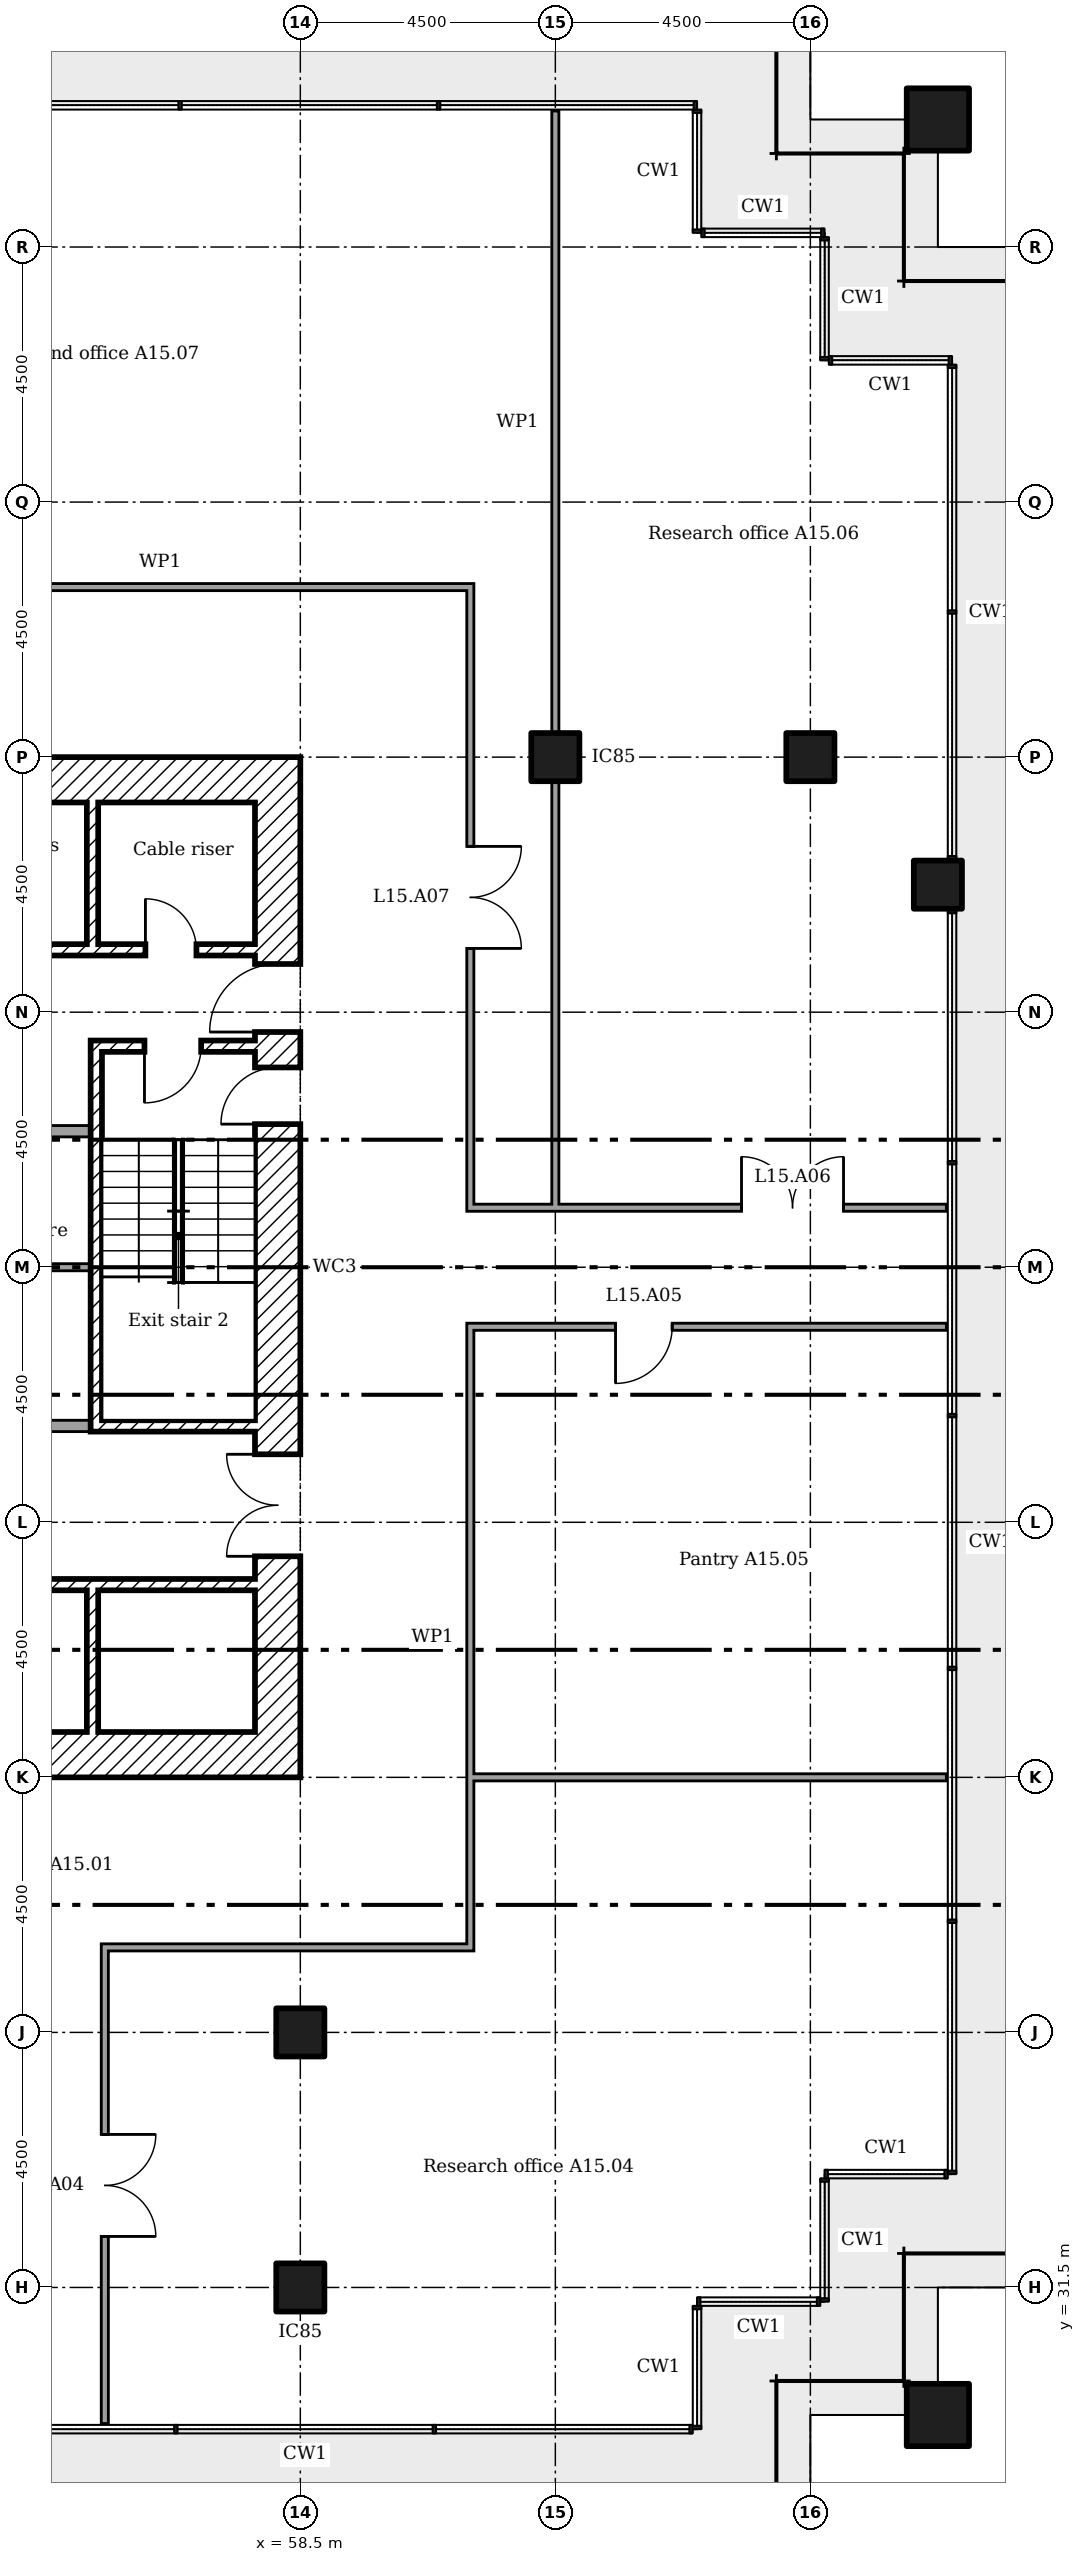
"""IFC4 building model, lengths in metres.
Left out: names, types, materials, properties, quantities, classifications, styles, units other than length and angle.
Written with IfcOpenShell. Run it as: python <this file> out.ifc"""

import sys

from ifc_helpers import new_model, si_unit, direction, frame, frame_2d, origin, origin_2d, place, context, subcontext, project, spatial, rectangle, extrude, element, fill, save


model = new_model("IFC4")
c1 = context("Model", 3, precision=1e-05, world=origin(), true_north=direction((0.0, 1.0)))
c2 = subcontext(c1, "Body", "Model", "MODEL_VIEW")
j1 = project(units=[si_unit("LENGTHUNIT", "METRE"), si_unit("PLANEANGLEUNIT", "RADIAN")], contexts=[c1])
p1 = place(None, origin())
s1 = spatial("IfcSite", under=j1, at=p1, CompositionType="ELEMENT")
p2 = place(p1, origin())
s2 = spatial("IfcBuilding", under=s1, at=p2, CompositionType="ELEMENT")
p3 = place(p2, frame((0.0, 0.0, 65.4)))
s3 = spatial("IfcBuildingStorey", under=s2, at=p3, CompositionType="ELEMENT", Elevation=65.4)
for number, where in (
    (1, (69.75, 29.25, 0.0)),
    (2, (69.75, 69.75, 0.0)),
):
    element("IfcColumn", number, at=place(p3, frame(where)), inside=s3, PredefinedType="COLUMN", context=c2, shape_type="SweptSolid", body=[
        extrude(rectangle(XDim=1.1, YDim=1.1, at=origin_2d()), origin(), (0.0, 0.0, 1.0), 3.6),
    ])
for number, where in (
    (3, (58.5, 31.5, 0.0)),
    (4, (58.5, 36.0, 0.0)),
    (5, (63.0, 58.5, 0.0)),
    (6, (67.5, 58.5, 0.0)),
    (7, (69.75, 56.25, 0.0)),
):
    element("IfcColumn", number, at=place(p3, frame(where)), inside=s3, PredefinedType="COLUMN", context=c2, shape_type="SweptSolid", body=[
        extrude(rectangle(XDim=0.85, YDim=0.85, at=origin_2d()), origin(), (0.0, 0.0, 1.0), 3.6),
    ])
p4 = place(p3, frame((58.1, 40.5, 0.0), z_axis=(0.0, 0.0, 1.0), x_axis=(0.0, 1.0, 0.0)))
e8 = element("IfcWall", 8, at=p4, inside=s3, PredefinedType="SHEAR", context=c2, shape_type="SweptSolid", body=[
    extrude(rectangle(XDim=18.0, YDim=0.8, at=frame_2d((9.0, 0.0))), origin(), (0.0, 0.0, 1.0), 3.35),
])
p5 = place(p4, frame((13.15, 0.0, 0.0)))
e9 = element("IfcOpeningElement", 9, at=p5, cuts=e8, PredefinedType="OPENING", context=c2, shape_type="SweptSolid", body=[
    extrude(rectangle(XDim=1.2, YDim=2.1, at=frame_2d((0.6, 1.05))), frame((0.0, 0.41, 0.0), z_axis=(0.0, -1.0, 0.0), x_axis=(1.0, 0.0, 0.0)), (0.0, 0.0, 1.0), 0.82),
])
p6 = place(p4, frame((3.9, 0.0, 0.0)))
e10 = element("IfcOpeningElement", 10, at=p6, cuts=e8, PredefinedType="OPENING", context=c2, shape_type="SweptSolid", body=[
    extrude(rectangle(XDim=1.8, YDim=2.1, at=frame_2d((0.9, 1.05))), frame((0.0, 0.41, 0.0), z_axis=(0.0, -1.0, 0.0), x_axis=(1.0, 0.0, 0.0)), (0.0, 0.0, 1.0), 0.82),
])
p7 = place(p4, frame((11.525, 0.0, 0.0)))
e11 = element("IfcOpeningElement", 11, at=p7, cuts=e8, PredefinedType="OPENING", context=c2, shape_type="SweptSolid", body=[
    extrude(rectangle(XDim=1.0, YDim=2.1, at=frame_2d((0.5, 1.05))), frame((0.0, 0.41, 0.0), z_axis=(0.0, -1.0, 0.0), x_axis=(1.0, 0.0, 0.0)), (0.0, 0.0, 1.0), 0.82),
])
for number, where in (
    (12, (41.3, 58.1, 0.0)),
    (13, (41.3, 40.9, 0.0)),
):
    element("IfcWall", number, at=place(p3, frame(where)), inside=s3, PredefinedType="SHEAR", context=c2, shape_type="SweptSolid", body=[
        extrude(rectangle(XDim=16.4, YDim=0.8, at=frame_2d((8.2, 0.0))), origin(), (0.0, 0.0, 1.0), 3.35),
    ])
for number, where, z_axis, x_axis in (
    (14, (54.833, 57.7, 0.0), (0.0, 0.0, 1.0), (0.0, -1.0, 0.0)),
    (15, (54.833, 41.3, 0.0), (0.0, 0.0, 1.0), (0.0, 1.0, 0.0)),
):
    element("IfcWall", number, at=place(p3, frame(where, z_axis=z_axis, x_axis=x_axis)), inside=s3, PredefinedType="SHEAR", context=c2, shape_type="SweptSolid", body=[
        extrude(rectangle(XDim=2.5, YDim=0.2, at=frame_2d((1.25, 0.0))), origin(), (0.0, 0.0, 1.0), 3.35),
    ])
p8 = place(p3, frame((46.933, 55.1, 0.0)))
e16 = element("IfcWall", 16, at=p8, inside=s3, PredefinedType="SHEAR", context=c2, shape_type="SweptSolid", body=[
    extrude(rectangle(XDim=10.767, YDim=0.2, at=frame_2d((5.383, 0.0))), origin(), (0.0, 0.0, 1.0), 3.35),
])
p9 = place(p8, frame((8.833, 0.0, 0.0)))
e17 = element("IfcOpeningElement", 17, at=p9, cuts=e16, PredefinedType="OPENING", context=c2, shape_type="SweptSolid", body=[
    extrude(rectangle(XDim=0.9, YDim=2.1, at=frame_2d((0.45, 1.05))), frame((0.0, 0.11, 0.0), z_axis=(0.0, -1.0, 0.0), x_axis=(1.0, 0.0, 0.0)), (0.0, 0.0, 1.0), 0.22),
])
p10 = place(p8, frame((2.117, 0.0, 0.0)))
e18 = element("IfcOpeningElement", 18, at=p10, cuts=e16, PredefinedType="OPENING", context=c2, shape_type="SweptSolid", body=[
    extrude(rectangle(XDim=0.9, YDim=2.1, at=frame_2d((0.45, 1.05))), frame((0.0, 0.11, 0.0), z_axis=(0.0, -1.0, 0.0), x_axis=(1.0, 0.0, 0.0)), (0.0, 0.0, 1.0), 0.22),
])
p11 = place(p8, frame((6.117, 0.0, 0.0)))
e19 = element("IfcOpeningElement", 19, at=p11, cuts=e16, PredefinedType="OPENING", context=c2, shape_type="SweptSolid", body=[
    extrude(rectangle(XDim=0.9, YDim=2.1, at=frame_2d((0.45, 1.05))), frame((0.0, 0.11, 0.0), z_axis=(0.0, -1.0, 0.0), x_axis=(1.0, 0.0, 0.0)), (0.0, 0.0, 1.0), 0.22),
])
p12 = place(p3, frame((41.3, 43.9, 0.0)))
e20 = element("IfcWall", 20, at=p12, inside=s3, PredefinedType="SHEAR", context=c2, shape_type="SweptSolid", body=[
    extrude(rectangle(XDim=16.4, YDim=0.2, at=frame_2d((8.2, 0.0))), origin(), (0.0, 0.0, 1.0), 3.35),
])
p13 = place(p12, frame((0.933, 0.0, 0.0)))
e21 = element("IfcOpeningElement", 21, at=p13, cuts=e20, PredefinedType="OPENING", context=c2, shape_type="SweptSolid", body=[
    extrude(rectangle(XDim=1.2, YDim=2.1, at=frame_2d((0.6, 1.05))), frame((0.0, 0.11, 0.0), z_axis=(0.0, -1.0, 0.0), x_axis=(1.0, 0.0, 0.0)), (0.0, 0.0, 1.0), 0.22),
])
p14 = place(p12, frame((3.6, 0.0, 0.0)))
e22 = element("IfcOpeningElement", 22, at=p14, cuts=e20, PredefinedType="OPENING", context=c2, shape_type="SweptSolid", body=[
    extrude(rectangle(XDim=1.2, YDim=2.1, at=frame_2d((0.6, 1.05))), frame((0.0, 0.11, 0.0), z_axis=(0.0, -1.0, 0.0), x_axis=(1.0, 0.0, 0.0)), (0.0, 0.0, 1.0), 0.22),
])
p15 = place(p12, frame((6.267, 0.0, 0.0)))
e23 = element("IfcOpeningElement", 23, at=p15, cuts=e20, PredefinedType="OPENING", context=c2, shape_type="SweptSolid", body=[
    extrude(rectangle(XDim=1.2, YDim=2.1, at=frame_2d((0.6, 1.05))), frame((0.0, 0.11, 0.0), z_axis=(0.0, -1.0, 0.0), x_axis=(1.0, 0.0, 0.0)), (0.0, 0.0, 1.0), 0.22),
])
p16 = place(p12, frame((8.933, 0.0, 0.0)))
e24 = element("IfcOpeningElement", 24, at=p16, cuts=e20, PredefinedType="OPENING", context=c2, shape_type="SweptSolid", body=[
    extrude(rectangle(XDim=1.2, YDim=2.1, at=frame_2d((0.6, 1.05))), frame((0.0, 0.11, 0.0), z_axis=(0.0, -1.0, 0.0), x_axis=(1.0, 0.0, 0.0)), (0.0, 0.0, 1.0), 0.22),
])
p17 = place(p3, frame((54.8, 53.4, 0.0)))
e25 = element("IfcWall", 25, at=p17, inside=s3, PredefinedType="SHEAR", context=c2, shape_type="SweptSolid", body=[
    extrude(rectangle(XDim=2.9, YDim=0.2, at=frame_2d((1.45, 0.0))), origin(), (0.0, 0.0, 1.0), 3.35),
])
p18 = place(p17, frame((0.95, 0.0, 0.0)))
e26 = element("IfcOpeningElement", 26, at=p18, cuts=e25, PredefinedType="OPENING", context=c2, shape_type="SweptSolid", body=[
    extrude(rectangle(XDim=1.0, YDim=2.1, at=frame_2d((0.5, 1.05))), frame((0.0, 0.11, 0.0), z_axis=(0.0, -1.0, 0.0), x_axis=(1.0, 0.0, 0.0)), (0.0, 0.0, 1.0), 0.22),
])
p19 = place(p3, frame((54.8, 46.7, 0.0)))
e27 = element("IfcWall", 27, at=p19, inside=s3, PredefinedType="SHEAR", context=c2, shape_type="SweptSolid", body=[
    extrude(rectangle(XDim=2.9, YDim=0.2, at=frame_2d((1.45, 0.0))), origin(), (0.0, 0.0, 1.0), 3.35),
])
p20 = place(p3, frame((54.9, 46.8, 0.0), z_axis=(0.0, 0.0, 1.0), x_axis=(0.0, 1.0, 0.0)))
e28 = element("IfcWall", 28, at=p20, inside=s3, PredefinedType="SHEAR", context=c2, shape_type="SweptSolid", body=[
    extrude(rectangle(XDim=6.5, YDim=0.2, at=frame_2d((3.25, 0.0))), origin(), (0.0, 0.0, 1.0), 3.35),
])
p21 = place(p3, frame((44.2, 51.9, 0.0)))
e29 = element("IfcWall", 29, at=p21, inside=s3, PredefinedType="PARTITIONING", context=c2, shape_type="SweptSolid", body=[
    extrude(rectangle(XDim=10.6, YDim=0.2, at=frame_2d((5.3, 0.0))), origin(), (0.0, 0.0, 1.0), 3.35),
])
p22 = place(p21, frame((8.5, 0.0, 0.0)))
e30 = element("IfcOpeningElement", 30, at=p22, cuts=e29, PredefinedType="OPENING", context=c2, shape_type="SweptSolid", body=[
    extrude(rectangle(XDim=0.9, YDim=2.1, at=frame_2d((0.45, 1.05))), frame((0.0, 0.11, 0.0), z_axis=(0.0, -1.0, 0.0), x_axis=(1.0, 0.0, 0.0)), (0.0, 0.0, 1.0), 0.22),
])
p23 = place(p3, frame((44.2, 46.7, 0.0)))
e31 = element("IfcWall", 31, at=p23, inside=s3, PredefinedType="PARTITIONING", context=c2, shape_type="SweptSolid", body=[
    extrude(rectangle(XDim=10.6, YDim=0.2, at=frame_2d((5.3, 0.0))), origin(), (0.0, 0.0, 1.0), 3.35),
])
p24 = place(p23, frame((2.0, 0.0, 0.0)))
e32 = element("IfcOpeningElement", 32, at=p24, cuts=e31, PredefinedType="OPENING", context=c2, shape_type="SweptSolid", body=[
    extrude(rectangle(XDim=0.9, YDim=2.1, at=frame_2d((0.45, 1.05))), frame((0.0, 0.11, 0.0), z_axis=(0.0, -1.0, 0.0), x_axis=(1.0, 0.0, 0.0)), (0.0, 0.0, 1.0), 0.22),
])
p25 = place(p23, frame((5.65, 0.0, 0.0)))
e33 = element("IfcOpeningElement", 33, at=p25, cuts=e31, PredefinedType="OPENING", context=c2, shape_type="SweptSolid", body=[
    extrude(rectangle(XDim=0.9, YDim=2.1, at=frame_2d((0.45, 1.05))), frame((0.0, 0.11, 0.0), z_axis=(0.0, -1.0, 0.0), x_axis=(1.0, 0.0, 0.0)), (0.0, 0.0, 1.0), 0.22),
])
p26 = place(p23, frame((8.5, 0.0, 0.0)))
e34 = element("IfcOpeningElement", 34, at=p26, cuts=e31, PredefinedType="OPENING", context=c2, shape_type="SweptSolid", body=[
    extrude(rectangle(XDim=0.9, YDim=2.1, at=frame_2d((0.45, 1.05))), frame((0.0, 0.11, 0.0), z_axis=(0.0, -1.0, 0.0), x_axis=(1.0, 0.0, 0.0)), (0.0, 0.0, 1.0), 0.22),
])
p27 = place(p3, frame((51.562, 49.5, 0.0)))
e35 = element("IfcWall", 35, at=p27, inside=s3, PredefinedType="PARTITIONING", context=c2, shape_type="SweptSolid", body=[
    extrude(rectangle(XDim=3.238, YDim=0.125, at=frame_2d((1.619, 0.0))), origin(), (0.0, 0.0, 1.0), 3.35),
])
p28 = place(p3, frame((54.988, 37.5, 0.0)))
e36 = element("IfcWall", 36, at=p28, inside=s3, PredefinedType="PARTITIONING", context=c2, shape_type="SweptSolid", body=[
    extrude(rectangle(XDim=6.575, YDim=0.125, at=frame_2d((3.288, 0.0))), origin(), (0.0, 0.0, 1.0), 3.45),
])
p29 = place(p3, frame((61.5, 40.5, 0.0)))
e37 = element("IfcWall", 37, at=p29, inside=s3, PredefinedType="PARTITIONING", context=c2, shape_type="SweptSolid", body=[
    extrude(rectangle(XDim=8.4, YDim=0.125, at=frame_2d((4.2, 0.0))), origin(), (0.0, 0.0, 1.0), 2.766),
])
p30 = place(p3, frame((61.438, 48.45, 0.0)))
e38 = element("IfcWall", 38, at=p30, inside=s3, PredefinedType="PARTITIONING", context=c2, shape_type="SweptSolid", body=[
    extrude(rectangle(XDim=8.462, YDim=0.125, at=frame_2d((4.231, 0.0))), origin(), (0.0, 0.0, 1.0), 3.45),
])
p31 = place(p30, frame((2.625, 0.0, 0.0)))
e39 = element("IfcOpeningElement", 39, at=p31, cuts=e38, PredefinedType="OPENING", context=c2, shape_type="SweptSolid", body=[
    extrude(rectangle(XDim=1.0, YDim=2.1, at=frame_2d((0.5, 1.05))), frame((0.0, 0.073, 0.0), z_axis=(0.0, -1.0, 0.0), x_axis=(1.0, 0.0, 0.0)), (0.0, 0.0, 1.0), 0.145),
])
p32 = place(p3, frame((61.438, 50.55, 0.0)))
e40 = element("IfcWall", 40, at=p32, inside=s3, PredefinedType="PARTITIONING", context=c2, shape_type="SweptSolid", body=[
    extrude(rectangle(XDim=8.462, YDim=0.125, at=frame_2d((4.231, 0.0))), origin(), (0.0, 0.0, 1.0), 3.45),
])
p33 = place(p32, frame((4.847, 0.0, 0.0)))
e41 = element("IfcOpeningElement", 41, at=p33, cuts=e40, PredefinedType="OPENING", context=c2, shape_type="SweptSolid", body=[
    extrude(rectangle(XDim=1.8, YDim=2.1, at=frame_2d((0.9, 1.05))), frame((0.0, 0.073, 0.0), z_axis=(0.0, -1.0, 0.0), x_axis=(1.0, 0.0, 0.0)), (0.0, 0.0, 1.0), 0.145),
])
p34 = place(p3, frame((50.488, 61.5, 0.0)))
e42 = element("IfcWall", 42, at=p34, inside=s3, PredefinedType="PARTITIONING", context=c2, shape_type="SweptSolid", body=[
    extrude(rectangle(XDim=11.075, YDim=0.125, at=frame_2d((5.538, 0.0))), origin(), (0.0, 0.0, 1.0), 3.45),
])
p35 = place(p3, frame((55.05, 29.1, 0.0), z_axis=(0.0, 0.0, 1.0), x_axis=(0.0, 1.0, 0.0)))
e43 = element("IfcWall", 43, at=p35, inside=s3, PredefinedType="PARTITIONING", context=c2, shape_type="SweptSolid", body=[
    extrude(rectangle(XDim=8.337, YDim=0.125, at=frame_2d((4.169, 0.0))), origin(), (0.0, 0.0, 1.0), 3.45),
])
p36 = place(p35, frame((3.3, 0.0, 0.0)))
e44 = element("IfcOpeningElement", 44, at=p36, cuts=e43, PredefinedType="OPENING", context=c2, shape_type="SweptSolid", body=[
    extrude(rectangle(XDim=1.8, YDim=2.1, at=frame_2d((0.9, 1.05))), frame((0.0, 0.073, 0.0), z_axis=(0.0, -1.0, 0.0), x_axis=(1.0, 0.0, 0.0)), (0.0, 0.0, 1.0), 0.145),
])
p37 = place(p3, frame((61.5, 37.562, 0.0), z_axis=(0.0, 0.0, 1.0), x_axis=(0.0, 1.0, 0.0)))
e45 = element("IfcWall", 45, at=p37, inside=s3, PredefinedType="PARTITIONING", context=c2, shape_type="SweptSolid", body=[
    extrude(rectangle(XDim=10.825, YDim=0.125, at=frame_2d((5.413, 0.0))), origin(), (0.0, 0.0, 1.0), 3.45),
])
p38 = place(p3, frame((61.5, 50.613, 0.0), z_axis=(0.0, 0.0, 1.0), x_axis=(0.0, 1.0, 0.0)))
e46 = element("IfcWall", 46, at=p38, inside=s3, PredefinedType="PARTITIONING", context=c2, shape_type="SweptSolid", body=[
    extrude(rectangle(XDim=10.825, YDim=0.125, at=frame_2d((5.413, 0.0))), origin(), (0.0, 0.0, 1.0), 3.45),
])
p39 = place(p38, frame((4.512, 0.0, 0.0)))
e47 = element("IfcOpeningElement", 47, at=p39, cuts=e46, PredefinedType="OPENING", context=c2, shape_type="SweptSolid", body=[
    extrude(rectangle(XDim=1.8, YDim=2.1, at=frame_2d((0.9, 1.05))), frame((0.0, 0.073, 0.0), z_axis=(0.0, -1.0, 0.0), x_axis=(1.0, 0.0, 0.0)), (0.0, 0.0, 1.0), 0.145),
])
p40 = place(p3, frame((63.0, 50.55, 0.0), z_axis=(0.0, 0.0, 1.0), x_axis=(0.0, 1.0, 0.0)))
e48 = element("IfcWall", 48, at=p40, inside=s3, PredefinedType="PARTITIONING", context=c2, shape_type="SweptSolid", body=[
    extrude(rectangle(XDim=7.525, YDim=0.125, at=frame_2d((3.762, 0.0))), origin(), (0.0, 0.0, 1.0), 3.45),
])
p41 = place(p3, frame((63.0, 58.925, 0.0), z_axis=(0.0, 0.0, 1.0), x_axis=(0.0, 1.0, 0.0)))
e49 = element("IfcWall", 49, at=p41, inside=s3, PredefinedType="PARTITIONING", context=c2, shape_type="SweptSolid", body=[
    extrude(rectangle(XDim=10.975, YDim=0.125, at=frame_2d((5.487, 0.0))), origin(), (0.0, 0.0, 1.0), 2.766),
])
p42 = place(p5, origin())
e50 = element("IfcDoor", 50, at=p42, inside=s3, OperationType="SINGLE_SWING_RIGHT", PredefinedType="DOOR", context=c2, shape_type="SweptSolid", body=[
    extrude(rectangle(XDim=1.2, YDim=2.1, at=frame_2d((0.6, 1.05))), frame((0.0, 0.025, 0.0), z_axis=(0.0, -1.0, 0.0), x_axis=(1.0, 0.0, 0.0)), (0.0, 0.0, 1.0), 0.05),
])
fill(e9, e50)
p43 = place(p6, origin())
e51 = element("IfcDoor", 51, at=p43, inside=s3, OperationType="DOUBLE_DOOR_SINGLE_SWING", PredefinedType="DOOR", context=c2, shape_type="SweptSolid", body=[
    extrude(rectangle(XDim=1.8, YDim=2.1, at=frame_2d((0.9, 1.05))), frame((0.0, 0.025, 0.0), z_axis=(0.0, -1.0, 0.0), x_axis=(1.0, 0.0, 0.0)), (0.0, 0.0, 1.0), 0.05),
])
fill(e10, e51)
p44 = place(p18, frame((1.0, 0.0, 0.0), x_axis=(-1.0, 0.0, 0.0)))
e52 = element("IfcDoor", 52, at=p44, inside=s3, OperationType="SINGLE_SWING_LEFT", PredefinedType="DOOR", context=c2, shape_type="SweptSolid", body=[
    extrude(rectangle(XDim=1.0, YDim=2.1, at=frame_2d((0.5, 1.05))), frame((0.0, 0.025, 0.0), z_axis=(0.0, -1.0, 0.0), x_axis=(1.0, 0.0, 0.0)), (0.0, 0.0, 1.0), 0.05),
])
fill(e26, e52)
p45 = place(p7, origin())
e53 = element("IfcDoor", 53, at=p45, inside=s3, OperationType="SINGLE_SWING_RIGHT", PredefinedType="DOOR", context=c2, shape_type="SweptSolid", body=[
    extrude(rectangle(XDim=1.0, YDim=2.1, at=frame_2d((0.5, 1.05))), frame((0.0, 0.025, 0.0), z_axis=(0.0, -1.0, 0.0), x_axis=(1.0, 0.0, 0.0)), (0.0, 0.0, 1.0), 0.05),
])
fill(e11, e53)
p46 = place(p9, origin())
e54 = element("IfcDoor", 54, at=p46, inside=s3, OperationType="SINGLE_SWING_RIGHT", PredefinedType="DOOR", context=c2, shape_type="SweptSolid", body=[
    extrude(rectangle(XDim=0.9, YDim=2.1, at=frame_2d((0.45, 1.05))), frame((0.0, 0.025, 0.0), z_axis=(0.0, -1.0, 0.0), x_axis=(1.0, 0.0, 0.0)), (0.0, 0.0, 1.0), 0.05),
])
fill(e17, e54)
p47 = place(p36, frame((1.8, 0.0, 0.0), x_axis=(-1.0, 0.0, 0.0)))
e55 = element("IfcDoor", 55, at=p47, inside=s3, OperationType="DOUBLE_DOOR_SINGLE_SWING", PredefinedType="DOOR", context=c2, shape_type="SweptSolid", body=[
    extrude(rectangle(XDim=1.8, YDim=2.1, at=frame_2d((0.9, 1.05))), frame((0.0, 0.025, 0.0), z_axis=(0.0, -1.0, 0.0), x_axis=(1.0, 0.0, 0.0)), (0.0, 0.0, 1.0), 0.05),
])
fill(e44, e55)
p48 = place(p31, frame((1.0, 0.0, 0.0), x_axis=(-1.0, 0.0, 0.0)))
e56 = element("IfcDoor", 56, at=p48, inside=s3, OperationType="SINGLE_SWING_LEFT", PredefinedType="DOOR", context=c2, shape_type="SweptSolid", body=[
    extrude(rectangle(XDim=1.0, YDim=2.1, at=frame_2d((0.5, 1.05))), frame((0.0, 0.025, 0.0), z_axis=(0.0, -1.0, 0.0), x_axis=(1.0, 0.0, 0.0)), (0.0, 0.0, 1.0), 0.05),
])
fill(e39, e56)
p49 = place(p33, origin())
e57 = element("IfcDoor", 57, at=p49, inside=s3, OperationType="DOUBLE_DOOR_SINGLE_SWING", PredefinedType="DOOR", context=c2, shape_type="SweptSolid", body=[
    extrude(rectangle(XDim=1.8, YDim=2.1, at=frame_2d((0.9, 1.05))), frame((0.0, 0.025, 0.0), z_axis=(0.0, -1.0, 0.0), x_axis=(1.0, 0.0, 0.0)), (0.0, 0.0, 1.0), 0.05),
])
fill(e41, e57)
p50 = place(p39, frame((1.8, 0.0, 0.0), x_axis=(-1.0, 0.0, 0.0)))
e58 = element("IfcDoor", 58, at=p50, inside=s3, OperationType="DOUBLE_DOOR_SINGLE_SWING", PredefinedType="DOOR", context=c2, shape_type="SweptSolid", body=[
    extrude(rectangle(XDim=1.8, YDim=2.1, at=frame_2d((0.9, 1.05))), frame((0.0, 0.025, 0.0), z_axis=(0.0, -1.0, 0.0), x_axis=(1.0, 0.0, 0.0)), (0.0, 0.0, 1.0), 0.05),
])
fill(e47, e58)
save(model, sys.argv[1])
